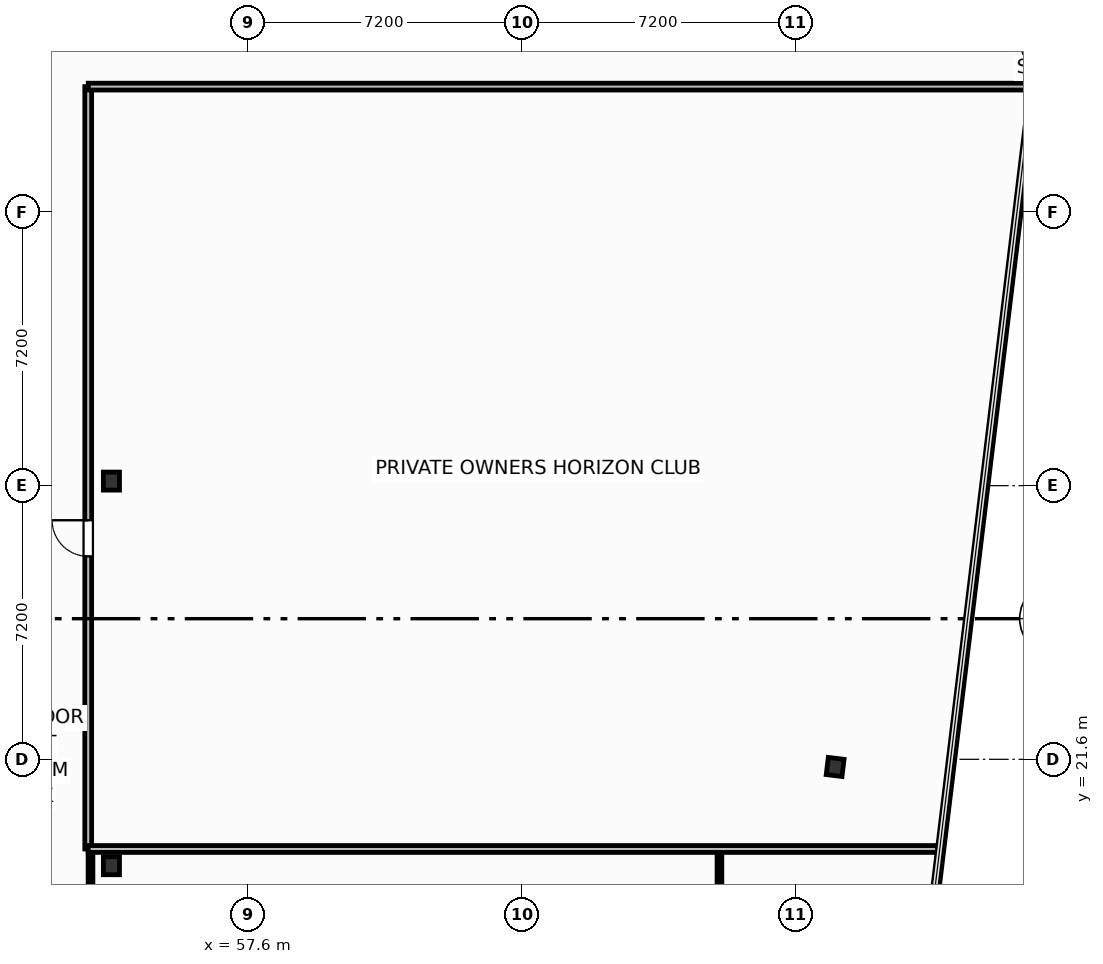
"""IFC4 building model, lengths in metres.
Left out: names, types, materials, properties, quantities, classifications, styles, units other than length and angle.
Written with IfcOpenShell. Run it as: python <this file> out.ifc"""

import sys

from ifc_helpers import new_model, si_unit, direction, frame, frame_2d, origin, origin_2d, place, context, subcontext, project, spatial, rectangle, i_section, extrude, element, fill, save


model = new_model("IFC4")
c1 = context("Model", 3, precision=1e-05, world=origin(), true_north=direction((0.0, 1.0)))
c2 = subcontext(c1, "Body", "Model", "MODEL_VIEW")
j1 = project(units=[si_unit("LENGTHUNIT", "METRE"), si_unit("PLANEANGLEUNIT", "RADIAN")], contexts=[c1])
p1 = place(None, origin())
s1 = spatial("IfcSite", under=j1, at=p1, CompositionType="ELEMENT")
p2 = place(p1, origin())
s2 = spatial("IfcBuilding", under=s1, at=p2, CompositionType="ELEMENT")
p3 = place(p2, frame((0.0, 0.0, 132.8)))
s3 = spatial("IfcBuildingStorey", under=s2, at=p3, CompositionType="ELEMENT", Elevation=132.8)
for number, where, z_axis, x_axis in (
    (1, (54.0, 18.8, 0.0), (0.0, 0.0, 1.0), (1.0, 0.0, 0.0)),
    (2, (54.0, 28.92, 0.0), (0.0, 0.0, 1.0), (1.0, 0.0, 0.0)),
):
    element("IfcColumn", number, at=place(p3, frame(where, z_axis=z_axis, x_axis=x_axis)), inside=s3, PredefinedType="COLUMN", context=c2, shape_type="SweptSolid", body=[
        extrude(i_section(OverallWidth=0.424, OverallDepth=0.474, WebThickness=0.048, FlangeThickness=0.077, FilletRadius=0.025, at=origin_2d()), origin(), (0.0, 0.0, 1.0), 3.7),
    ])
p4 = place(p3, frame((73.044, 21.399, 0.0), z_axis=(0.0, 0.0, 1.0), x_axis=(0.992732158755, -0.12034475881, 0.0)))
e3 = element("IfcColumn", 3, at=p4, inside=s3, PredefinedType="COLUMN", context=c2, shape_type="SweptSolid", body=[
    extrude(i_section(OverallWidth=0.418, OverallDepth=0.455, WebThickness=0.042, FlangeThickness=0.068, FilletRadius=0.025, at=origin_2d()), origin(), (0.0, 0.0, 1.0), 3.7),
])
p5 = place(p3, frame((78.155, 40.109, 0.0), z_axis=(0.0, 0.0, 1.0), x_axis=(-0.268639368869, 0.963240826322, 0.0)))
e4 = element("IfcWall", 4, at=p5, inside=s3, PredefinedType="SOLIDWALL", context=c2, shape_type="SweptSolid", body=[
    extrude(rectangle(XDim=1.353, YDim=0.22, at=frame_2d((0.677, 0.0))), origin(), (0.0, 0.0, 1.0), 2.73),
])
for number, where, z_axis, x_axis in (
    (5, (53.45, 16.61, 0.0), (0.0, 0.0, 1.0), (0.0, 1.0, 0.0)),
    (6, (70.0, 16.61, 0.0), (0.0, 0.0, 1.0), (0.0, 1.0, 0.0)),
):
    element("IfcWall", number, at=place(p3, frame(where, z_axis=z_axis, x_axis=x_axis)), inside=s3, PredefinedType="PARTITIONING", context=c2, shape_type="SweptSolid", body=[
        extrude(rectangle(XDim=2.63, YDim=0.125, at=frame_2d((1.315, 0.0))), origin(), (0.0, 0.0, 1.0), 3.45),
    ])
p6 = place(p3, frame((53.39, 19.24, 0.0), z_axis=(0.0, 0.0, 1.0), x_axis=(0.0, 1.0, 0.0)))
e7 = element("IfcWall", 7, at=p6, inside=s3, PredefinedType="PARTITIONING", context=c2, shape_type="SweptSolid", body=[
    extrude(rectangle(XDim=20.06, YDim=0.18, at=frame_2d((10.03, 0.0))), origin(), (0.0, 0.0, 1.0), 3.45),
])
p7 = place(p6, frame((7.7, 0.0, 0.0)))
e8 = element("IfcOpeningElement", 8, at=p7, cuts=e7, PredefinedType="OPENING", context=c2, shape_type="SweptSolid", body=[
    extrude(rectangle(XDim=0.95, YDim=2.05, at=frame_2d((0.475, 1.025))), frame((0.0, 0.1, 0.0), z_axis=(0.0, -1.0, 0.0), x_axis=(1.0, 0.0, 0.0)), (0.0, 0.0, 1.0), 0.2),
])
p8 = place(p3, frame((53.39, 19.24, 0.0), z_axis=(0.0, 0.0, 1.0), x_axis=(1.0, 0.0, 0.0)))
e9 = element("IfcWall", 9, at=p8, inside=s3, PredefinedType="PARTITIONING", context=c2, shape_type="SweptSolid", body=[
    extrude(rectangle(XDim=22.367, YDim=0.18, at=frame_2d((11.183, 0.0))), origin(), (0.0, 0.0, 1.0), 2.662),
])
p9 = place(p3, frame((53.39, 39.3, 0.0), z_axis=(0.0, 0.0, 1.0), x_axis=(1.0, 0.0, 0.0)))
e10 = element("IfcWall", 10, at=p9, inside=s3, PredefinedType="PARTITIONING", context=c2, shape_type="SweptSolid", body=[
    extrude(rectangle(XDim=24.74, YDim=0.18, at=frame_2d((12.37, 0.0))), origin(), (0.0, 0.0, 1.0), 3.45),
])
p10 = place(p7, origin())
e11 = element("IfcDoor", 11, at=p10, inside=s3, OperationType="SINGLE_SWING_RIGHT", PredefinedType="DOOR", context=c2, shape_type="SweptSolid", body=[
    extrude(rectangle(XDim=0.95, YDim=2.05, at=frame_2d((0.475, 1.025))), frame((0.0, 0.025, 0.0), z_axis=(0.0, -1.0, 0.0), x_axis=(1.0, 0.0, 0.0)), (0.0, 0.0, 1.0), 0.05),
])
fill(e8, e11)
save(model, sys.argv[1])
